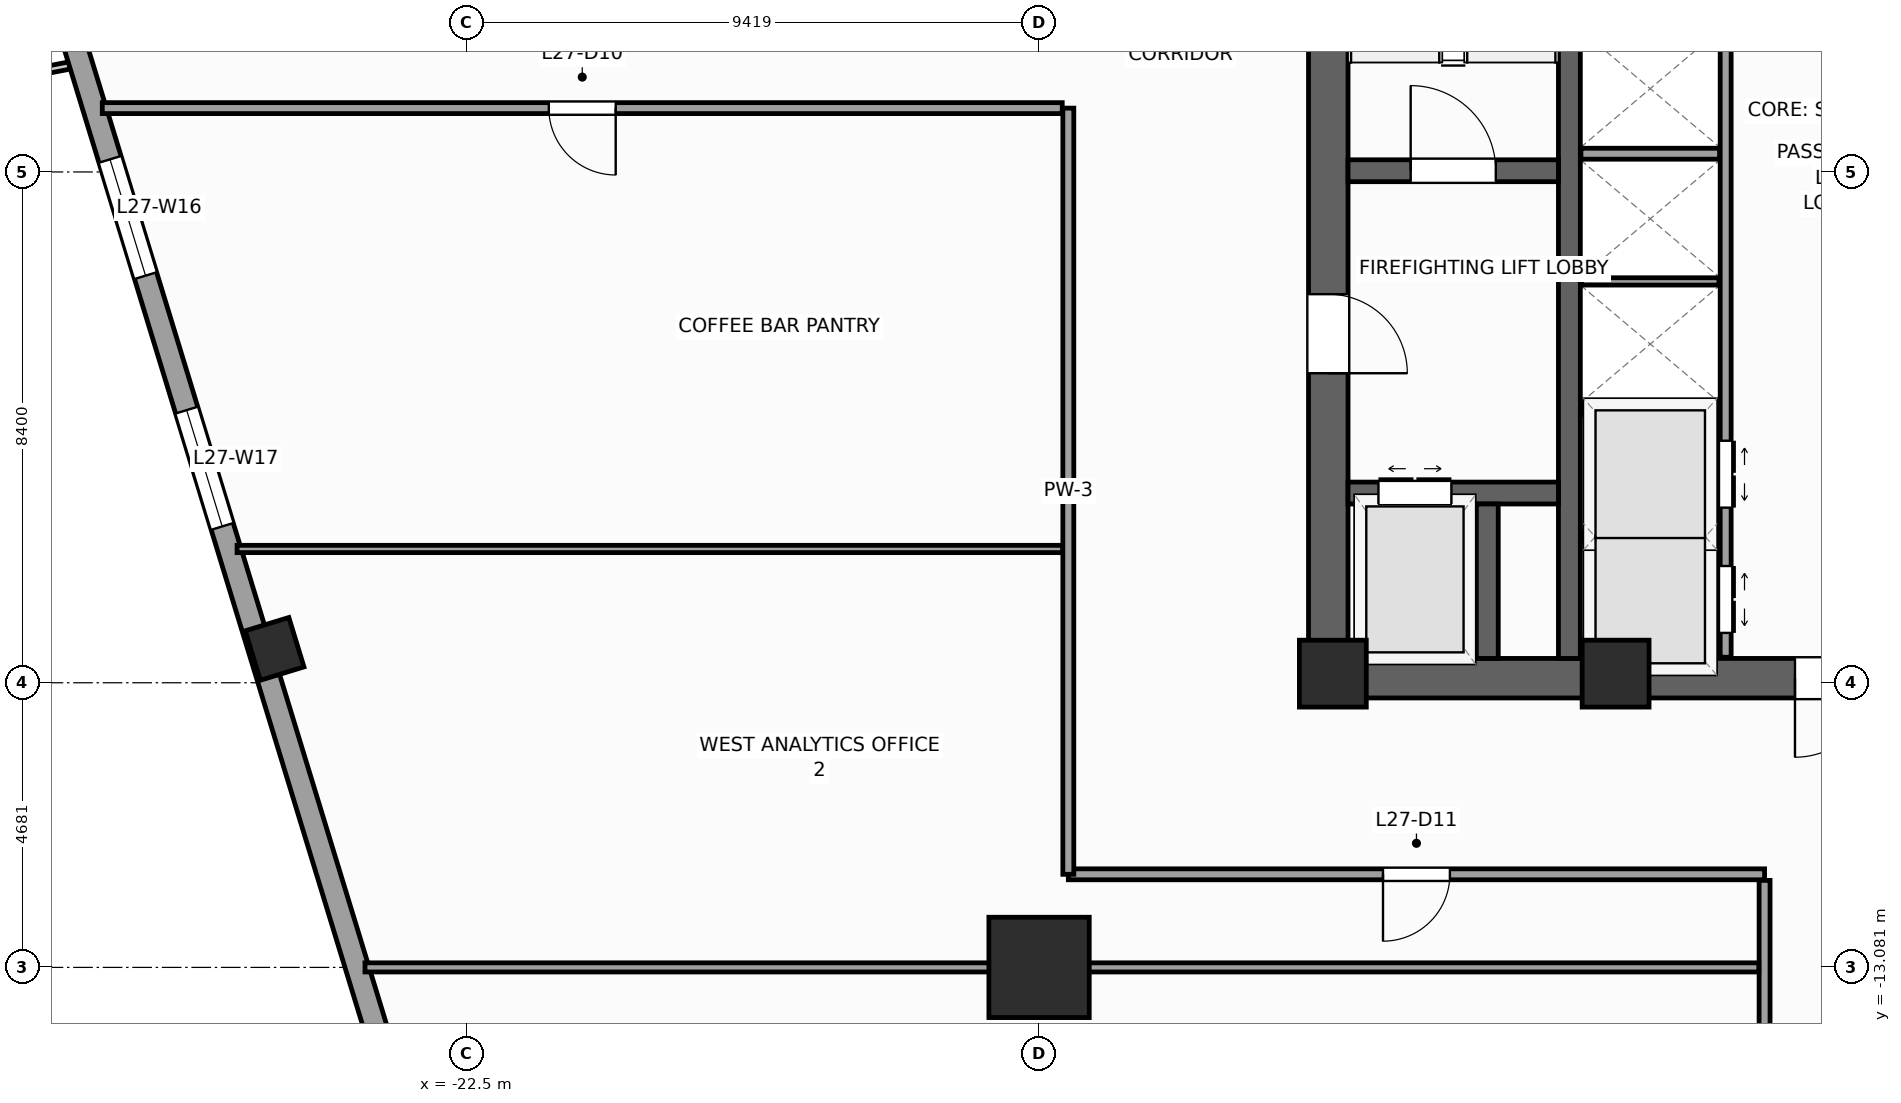
"""IFC4 building model, lengths in metres.
Left out: names, types, materials, properties, quantities, classifications, styles, units other than length and angle.
Written with IfcOpenShell. Run it as: python <this file> out.ifc"""

import sys

from ifc_helpers import new_model, si_unit, direction, frame, frame_2d, origin, origin_2d, place, context, subcontext, project, spatial, rectangle, extrude, source, transform, mapped, element, fill, save


model = new_model("IFC4")
c1 = context("Model", 3, precision=1e-05, world=origin(), true_north=direction((0.0, 1.0)))
c2 = subcontext(c1, "Body", "Model", "MODEL_VIEW")
j1 = project(units=[si_unit("LENGTHUNIT", "METRE"), si_unit("PLANEANGLEUNIT", "RADIAN")], contexts=[c1])
p1 = place(None, origin())
s1 = spatial("IfcSite", under=j1, at=p1, CompositionType="ELEMENT")
p2 = place(p1, origin())
s2 = spatial("IfcBuilding", under=s1, at=p2, CompositionType="ELEMENT")
p3 = place(p2, frame((0.0, 0.0, 115.2)))
s3 = spatial("IfcBuildingStorey", under=s2, at=p3, CompositionType="ELEMENT", Elevation=115.2)
p4 = place(p3, frame((-8.65, -8.325, 0.0), z_axis=(0.0, 0.0, 1.0), x_axis=(1.0, 0.0, 0.0)))
e1 = element("IfcWall", 1, at=p4, inside=s3, PredefinedType="SHEAR", context=c2, shape_type="SweptSolid", body=[
    extrude(rectangle(XDim=17.3, YDim=0.65, at=frame_2d((8.65, 0.0))), origin(), (0.0, 0.0, 1.0), 4.0),
])
p5 = place(p4, frame((8.0, 0.0, 0.0)))
e2 = element("IfcOpeningElement", 2, at=p5, cuts=e1, PredefinedType="OPENING", context=c2, shape_type="SweptSolid", body=[
    extrude(rectangle(XDim=1.3, YDim=2.2, at=frame_2d((0.65, 1.1))), frame((0.0, 0.335, 0.0), z_axis=(0.0, -1.0, 0.0), x_axis=(1.0, 0.0, 0.0)), (0.0, 0.0, 1.0), 0.67),
])
p6 = place(p3, frame((-8.325, -8.0, 0.0), z_axis=(0.0, 0.0, 1.0), x_axis=(0.0, 1.0, 0.0)))
e3 = element("IfcWall", 3, at=p6, inside=s3, PredefinedType="SHEAR", context=c2, shape_type="SweptSolid", body=[
    extrude(rectangle(XDim=16.0, YDim=0.65, at=frame_2d((8.0, 0.0))), origin(), (0.0, 0.0, 1.0), 4.0),
])
p7 = place(p6, frame((4.69, 0.0, 0.0)))
e4 = element("IfcOpeningElement", 4, at=p7, cuts=e3, PredefinedType="OPENING", context=c2, shape_type="SweptSolid", body=[
    extrude(rectangle(XDim=1.3, YDim=2.2, at=frame_2d((0.65, 1.1))), frame((0.0, 0.335, 0.0), z_axis=(0.0, -1.0, 0.0), x_axis=(1.0, 0.0, 0.0)), (0.0, 0.0, 1.0), 0.67),
])
p8 = place(p3, frame((-4.36, -8.0, 0.0), z_axis=(0.0, 0.0, 1.0), x_axis=(0.0, 1.0, 0.0)))
e5 = element("IfcWall", 5, at=p8, inside=s3, PredefinedType="SHEAR", context=c2, shape_type="SweptSolid", body=[
    extrude(rectangle(XDim=16.0, YDim=0.36, at=frame_2d((8.0, 0.0))), origin(), (0.0, 0.0, 1.0), 4.0),
])
p9 = place(p3, frame((-8.0, 0.02, 0.0), z_axis=(0.0, 0.0, 1.0), x_axis=(1.0, 0.0, 0.0)))
e6 = element("IfcWall", 6, at=p9, inside=s3, PredefinedType="SHEAR", context=c2, shape_type="SweptSolid", body=[
    extrude(rectangle(XDim=3.46, YDim=0.36, at=frame_2d((1.73, 0.0))), origin(), (0.0, 0.0, 1.0), 4.0),
])
p10 = place(p9, frame((1.03, 0.0, 0.0)))
e7 = element("IfcOpeningElement", 7, at=p10, cuts=e6, PredefinedType="OPENING", context=c2, shape_type="SweptSolid", body=[
    extrude(rectangle(XDim=1.4, YDim=2.2, at=frame_2d((0.7, 1.1))), frame((0.0, 0.19, 0.0), z_axis=(0.0, -1.0, 0.0), x_axis=(1.0, 0.0, 0.0)), (0.0, 0.0, 1.0), 0.38),
])
p11 = place(p3, frame((-8.0, -5.28, 0.0), z_axis=(0.0, 0.0, 1.0), x_axis=(1.0, 0.0, 0.0)))
e8 = element("IfcWall", 8, at=p11, inside=s3, PredefinedType="SHEAR", context=c2, shape_type="SweptSolid", body=[
    extrude(rectangle(XDim=3.46, YDim=0.36, at=frame_2d((1.73, 0.0))), origin(), (0.0, 0.0, 1.0), 4.0),
])
p12 = place(p11, frame((0.5, 0.0, 0.0)))
e9 = element("IfcOpeningElement", 9, at=p12, cuts=e8, PredefinedType="OPENING", context=c2, shape_type="SweptSolid", body=[
    extrude(rectangle(XDim=1.2, YDim=2.25, at=frame_2d((0.6, 1.125))), frame((0.0, 0.19, 0.0), z_axis=(0.0, -1.0, 0.0), x_axis=(1.0, 0.0, 0.0)), (0.0, 0.0, 1.0), 0.38),
])
p13 = place(p3, frame((-5.71, -8.0, 0.0), z_axis=(0.0, 0.0, 1.0), x_axis=(0.0, 1.0, 0.0)))
e10 = element("IfcWall", 10, at=p13, inside=s3, PredefinedType="SHEAR", context=c2, shape_type="SweptSolid", body=[
    extrude(rectangle(XDim=2.54, YDim=0.36, at=frame_2d((1.27, 0.0))), origin(), (0.0, 0.0, 1.0), 4.0),
])
m1 = source(origin(), c2, "Body", "SweptSolid", [
    extrude(rectangle(XDim=1.1, YDim=1.1, at=origin_2d()), origin(), (0.0, 0.0, 1.0), 4.0),
])
for number, where, z_axis, x_axis in (
    (11, (-8.25, -8.25, 0.0), (0.0, 0.0, 1.0), (1.0, 0.0, 0.0)),
    (12, (-3.6, -8.25, 0.0), (0.0, 0.0, 1.0), (1.0, 0.0, 0.0)),
):
    element("IfcColumn", number, at=place(p3, frame(where, z_axis=z_axis, x_axis=x_axis)), inside=s3, PredefinedType="PILASTER", context=c2, shape_type="MappedRepresentation", body=[
        mapped(m1, transform((0.0, 0.0, 0.0), scale=1.0)),
    ])
m2 = source(origin(), c2, "Body", "SweptSolid", [
    extrude(rectangle(XDim=1.65, YDim=1.65, at=origin_2d()), origin(), (0.0, 0.0, 1.0), 4.0),
])
p14 = place(p3, frame((-13.081, -13.081, 0.0), z_axis=(0.0, 0.0, 1.0), x_axis=(1.0, 0.0, 0.0)))
e13 = element("IfcColumn", 13, at=p14, inside=s3, PredefinedType="COLUMN", context=c2, shape_type="MappedRepresentation", body=[
    mapped(m2, transform((0.0, 0.0, 0.0), scale=1.0)),
])
m3 = source(origin(), c2, "Body", "SweptSolid", [
    extrude(rectangle(XDim=0.75, YDim=0.85, at=origin_2d()), origin(), (0.0, 0.0, 1.0), 4.0),
])
p15 = place(p3, frame((-25.653, -7.843, 0.0), z_axis=(0.0, 0.0, 1.0), x_axis=(0.956304755963, 0.292371704723, 0.0)))
e14 = element("IfcColumn", 14, at=p15, inside=s3, PredefinedType="COLUMN", context=c2, shape_type="MappedRepresentation", body=[
    mapped(m3, transform((0.0, 0.0, 0.0), scale=1.0)),
])
p16 = place(p3, frame((-32.658, 14.265, 0.0), z_axis=(0.0, 0.0, 1.0), x_axis=(0.292373127906, -0.956304320851, 0.0)))
e15 = element("IfcWall", 15, at=p16, inside=s3, PredefinedType="STANDARD", context=c2, shape_type="SweptSolid", body=[
    extrude(rectangle(XDim=46.38, YDim=0.38, at=frame_2d((23.19, 0.0))), origin(), (0.0, 0.0, 1.0), 3.14),
])
p17 = place(p16, frame((4.865, 0.0, 0.51)))
e16 = element("IfcOpeningElement", 16, at=p17, cuts=e15, PredefinedType="OPENING", context=c2, shape_type="SweptSolid", body=[
    extrude(rectangle(XDim=1.4, YDim=2.4, at=frame_2d((0.7, 1.2))), frame((0.0, 0.2, 0.0), z_axis=(0.0, -1.0, 0.0), x_axis=(1.0, 0.0, 0.0)), (0.0, 0.0, 1.0), 0.4),
])
p18 = place(p16, frame((14.7, 0.0, 0.51)))
e17 = element("IfcOpeningElement", 17, at=p18, cuts=e15, PredefinedType="OPENING", context=c2, shape_type="SweptSolid", body=[
    extrude(rectangle(XDim=2.0, YDim=2.4, at=frame_2d((1.0, 1.2))), frame((0.0, 0.2, 0.0), z_axis=(0.0, -1.0, 0.0), x_axis=(1.0, 0.0, 0.0)), (0.0, 0.0, 1.0), 0.4),
])
p19 = place(p16, frame((19.012, 0.0, 0.51)))
e18 = element("IfcOpeningElement", 18, at=p19, cuts=e15, PredefinedType="OPENING", context=c2, shape_type="SweptSolid", body=[
    extrude(rectangle(XDim=2.0, YDim=2.4, at=frame_2d((1.0, 1.2))), frame((0.0, 0.2, 0.0), z_axis=(0.0, -1.0, 0.0), x_axis=(1.0, 0.0, 0.0)), (0.0, 0.0, 1.0), 0.4),
])
p20 = place(p16, frame((30.538, 0.0, 0.51)))
e19 = element("IfcOpeningElement", 19, at=p20, cuts=e15, PredefinedType="OPENING", context=c2, shape_type="SweptSolid", body=[
    extrude(rectangle(XDim=2.0, YDim=2.4, at=frame_2d((1.0, 1.2))), frame((0.0, 0.2, 0.0), z_axis=(0.0, -1.0, 0.0), x_axis=(1.0, 0.0, 0.0)), (0.0, 0.0, 1.0), 0.4),
])
p21 = place(p16, frame((39.187, 0.0, 0.51)))
e20 = element("IfcOpeningElement", 20, at=p21, cuts=e15, PredefinedType="OPENING", context=c2, shape_type="SweptSolid", body=[
    extrude(rectangle(XDim=1.4, YDim=2.4, at=frame_2d((0.7, 1.2))), frame((0.0, 0.2, 0.0), z_axis=(0.0, -1.0, 0.0), x_axis=(1.0, 0.0, 0.0)), (0.0, 0.0, 1.0), 0.4),
])
p22 = place(p3, frame((-1.79, -7.98, 0.0), z_axis=(0.0, 0.0, 1.0), x_axis=(0.0, 1.0, 0.0)))
e21 = element("IfcWall", 21, at=p22, inside=s3, PredefinedType="PARTITIONING", context=c2, shape_type="SweptSolid", body=[
    extrude(rectangle(XDim=12.38, YDim=0.18, at=frame_2d((6.19, 0.0))), origin(), (0.0, 0.0, 1.0), 3.74),
])
p23 = place(p22, frame((0.4, 0.0, 0.0)))
e22 = element("IfcOpeningElement", 22, at=p23, cuts=e21, PredefinedType="OPENING", context=c2, shape_type="SweptSolid", body=[
    extrude(rectangle(XDim=1.1, YDim=2.2, at=frame_2d((0.55, 1.1))), frame((0.0, 0.1, 0.0), z_axis=(0.0, -1.0, 0.0), x_axis=(1.0, 0.0, 0.0)), (0.0, 0.0, 1.0), 0.2),
])
p24 = place(p22, frame((2.46, 0.0, 0.0)))
e23 = element("IfcOpeningElement", 23, at=p24, cuts=e21, PredefinedType="OPENING", context=c2, shape_type="SweptSolid", body=[
    extrude(rectangle(XDim=1.1, YDim=2.2, at=frame_2d((0.55, 1.1))), frame((0.0, 0.1, 0.0), z_axis=(0.0, -1.0, 0.0), x_axis=(1.0, 0.0, 0.0)), (0.0, 0.0, 1.0), 0.2),
])
for number, where, z_axis, x_axis in (
    (24, (-4.17, -3.9, 0.0), (0.0, 0.0, 1.0), (1.0, 0.0, 0.0)),
    (25, (-4.17, 0.3, 0.0), (0.0, 0.0, 1.0), (1.0, 0.0, 0.0)),
):
    element("IfcWall", number, at=place(p3, frame(where, z_axis=z_axis, x_axis=x_axis)), inside=s3, PredefinedType="PARTITIONING", context=c2, shape_type="SweptSolid", body=[
        extrude(rectangle(XDim=2.28, YDim=0.18, at=frame_2d((1.14, 0.0))), origin(), (0.0, 0.0, 1.0), 3.74),
    ])
for number, where, z_axis, x_axis in (
    (26, (-4.16, -6.0, 0.0), (0.0, 0.0, 1.0), (1.0, 0.0, 0.0)),
    (27, (-4.16, -1.8, 0.0), (0.0, 0.0, 1.0), (1.0, 0.0, 0.0)),
):
    element("IfcWall", number, at=place(p3, frame(where, z_axis=z_axis, x_axis=x_axis)), inside=s3, PredefinedType="PARTITIONING", context=c2, shape_type="SweptSolid", body=[
        extrude(rectangle(XDim=2.26, YDim=0.12, at=frame_2d((1.13, 0.0))), origin(), (0.0, 0.0, 1.0), 3.74),
    ])
p25 = place(p3, frame((-12.6, -11.55, 0.0), z_axis=(0.0, 0.0, 1.0), x_axis=(1.0, 0.0, 0.0)))
e28 = element("IfcWall", 28, at=p25, inside=s3, PredefinedType="PARTITIONING", context=c2, shape_type="SweptSolid", body=[
    extrude(rectangle(XDim=11.45, YDim=0.18, at=frame_2d((5.725, 0.0))), origin(), (0.0, 0.0, 1.0), 3.74),
])
p26 = place(p25, frame((5.175, 0.0, 0.0)))
e29 = element("IfcOpeningElement", 29, at=p26, cuts=e28, PredefinedType="OPENING", context=c2, shape_type="SweptSolid", body=[
    extrude(rectangle(XDim=1.1, YDim=2.2, at=frame_2d((0.55, 1.1))), frame((0.0, 0.1, 0.0), z_axis=(0.0, -1.0, 0.0), x_axis=(1.0, 0.0, 0.0)), (0.0, 0.0, 1.0), 0.2),
])
p27 = place(p3, frame((-12.6, -11.55, 0.0), z_axis=(0.0, 0.0, 1.0), x_axis=(0.0, 1.0, 0.0)))
e30 = element("IfcWall", 30, at=p27, inside=s3, PredefinedType="PARTITIONING", context=c2, shape_type="SweptSolid", body=[
    extrude(rectangle(XDim=12.6, YDim=0.18, at=frame_2d((6.3, 0.0))), origin(), (0.0, 0.0, 1.0), 3.74),
])
p28 = place(p3, frame((-28.487, 1.05, 0.0), z_axis=(0.0, 0.0, 1.0), x_axis=(1.0, 0.0, 0.0)))
e31 = element("IfcWall", 31, at=p28, inside=s3, PredefinedType="PARTITIONING", context=c2, shape_type="SweptSolid", body=[
    extrude(rectangle(XDim=15.787, YDim=0.18, at=frame_2d((7.894, 0.0))), origin(), (0.0, 0.0, 1.0), 3.74),
])
p29 = place(p28, frame((7.343, 0.0, 0.0)))
e32 = element("IfcOpeningElement", 32, at=p29, cuts=e31, PredefinedType="OPENING", context=c2, shape_type="SweptSolid", body=[
    extrude(rectangle(XDim=1.1, YDim=2.2, at=frame_2d((0.55, 1.1))), frame((0.0, 0.1, 0.0), z_axis=(0.0, -1.0, 0.0), x_axis=(1.0, 0.0, 0.0)), (0.0, 0.0, 1.0), 0.2),
])
p30 = place(p3, frame((-1.15, -28.517, 0.0), z_axis=(0.0, 0.0, 1.0), x_axis=(0.0, 1.0, 0.0)))
e33 = element("IfcWall", 33, at=p30, inside=s3, PredefinedType="PARTITIONING", context=c2, shape_type="SweptSolid", body=[
    extrude(rectangle(XDim=16.867, YDim=0.18, at=frame_2d((8.434, 0.0))), origin(), (0.0, 0.0, 1.0), 3.74),
])
p31 = place(p30, frame((7.333, 0.0, 0.0)))
e34 = element("IfcOpeningElement", 34, at=p31, cuts=e33, PredefinedType="OPENING", context=c2, shape_type="SweptSolid", body=[
    extrude(rectangle(XDim=1.1, YDim=2.2, at=frame_2d((0.55, 1.1))), frame((0.0, 0.1, 0.0), z_axis=(0.0, -1.0, 0.0), x_axis=(1.0, 0.0, 0.0)), (0.0, 0.0, 1.0), 0.2),
])
p32 = place(p3, frame((-24.167, -13.081, 0.0), z_axis=(0.0, 0.0, 1.0), x_axis=(1.0, 0.0, 0.0)))
e35 = element("IfcWall", 35, at=p32, inside=s3, PredefinedType="PARTITIONING", context=c2, shape_type="SweptSolid", body=[
    extrude(rectangle(XDim=22.921, YDim=0.15, at=frame_2d((11.461, 0.0))), origin(), (0.0, 0.0, 1.0), 2.732),
])
p33 = place(p3, frame((-26.27, -6.2, 0.0), z_axis=(0.0, 0.0, 1.0), x_axis=(1.0, 0.0, 0.0)))
e36 = element("IfcWall", 36, at=p33, inside=s3, PredefinedType="PARTITIONING", context=c2, shape_type="SweptSolid", body=[
    extrude(rectangle(XDim=13.575, YDim=0.12, at=frame_2d((6.788, 0.0))), origin(), (0.0, 0.0, 1.0), 3.74),
])
m4 = source(origin(), c2, "Body", "SweptSolid", [
    extrude(rectangle(XDim=2.0, YDim=2.4, at=frame_2d((1.0, 1.2))), frame((0.0, 0.03, 0.0), z_axis=(0.0, -1.0, 0.0), x_axis=(1.0, 0.0, 0.0)), (0.0, 0.0, 1.0), 0.06),
])
p34 = place(p18, origin())
e37 = element("IfcWindow", 37, at=p34, inside=s3, PartitioningType="SINGLE_PANEL", PredefinedType="WINDOW", context=c2, shape_type="MappedRepresentation", body=[
    mapped(m4, transform((0.0, 0.0, 0.0), scale=1.0)),
])
fill(e17, e37)
p35 = place(p19, origin())
e38 = element("IfcWindow", 38, at=p35, inside=s3, PartitioningType="SINGLE_PANEL", PredefinedType="WINDOW", context=c2, shape_type="MappedRepresentation", body=[
    mapped(m4, transform((0.0, 0.0, 0.0), scale=1.0)),
])
fill(e18, e38)
m5 = source(origin(), c2, "Body", "SweptSolid", [
    extrude(rectangle(XDim=1.4, YDim=2.2, at=frame_2d((0.7, 1.1))), frame((0.0, 0.025, 0.0), z_axis=(0.0, -1.0, 0.0), x_axis=(1.0, 0.0, 0.0)), (0.0, 0.0, 1.0), 0.05),
])
p36 = place(p10, origin())
e39 = element("IfcDoor", 39, at=p36, inside=s3, OperationType="SINGLE_SWING_LEFT", PredefinedType="DOOR", context=c2, shape_type="MappedRepresentation", body=[
    mapped(m5, transform((0.0, 0.0, 0.0), scale=1.0)),
])
fill(e7, e39)
m6 = source(origin(), c2, "Body", "SweptSolid", [
    extrude(rectangle(XDim=1.3, YDim=2.2, at=frame_2d((0.65, 1.1))), frame((0.0, 0.025, 0.0), z_axis=(0.0, -1.0, 0.0), x_axis=(1.0, 0.0, 0.0)), (0.0, 0.0, 1.0), 0.05),
])
p37 = place(p7, frame((1.3, 0.0, 0.0), z_axis=(0.0, 0.0, 1.0), x_axis=(-1.0, 0.0, 0.0)))
e40 = element("IfcDoor", 40, at=p37, inside=s3, OperationType="SINGLE_SWING_LEFT", PredefinedType="DOOR", context=c2, shape_type="MappedRepresentation", body=[
    mapped(m6, transform((0.0, 0.0, 0.0), scale=1.0)),
])
fill(e4, e40)
p38 = place(p5, frame((1.3, 0.0, 0.0), z_axis=(0.0, 0.0, 1.0), x_axis=(-1.0, 0.0, 0.0)))
e41 = element("IfcDoor", 41, at=p38, inside=s3, OperationType="SINGLE_SWING_LEFT", PredefinedType="DOOR", context=c2, shape_type="MappedRepresentation", body=[
    mapped(m6, transform((0.0, 0.0, 0.0), scale=1.0)),
])
fill(e2, e41)
m7 = source(origin(), c2, "Body", "SweptSolid", [
    extrude(rectangle(XDim=1.2, YDim=2.25, at=frame_2d((0.6, 1.125))), frame((0.0, 0.025, 0.0), z_axis=(0.0, -1.0, 0.0), x_axis=(1.0, 0.0, 0.0)), (0.0, 0.0, 1.0), 0.05),
])
p39 = place(p12, origin())
e42 = element("IfcDoor", 42, at=p39, inside=s3, OperationType="DOUBLE_DOOR_SLIDING", PredefinedType="DOOR", context=c2, shape_type="MappedRepresentation", body=[
    mapped(m7, transform((0.0, 0.0, 0.0), scale=1.0)),
])
fill(e9, e42)
m8 = source(origin(), c2, "Body", "SweptSolid", [
    extrude(rectangle(XDim=1.1, YDim=2.2, at=frame_2d((0.55, 1.1))), frame((0.0, 0.025, 0.0), z_axis=(0.0, -1.0, 0.0), x_axis=(1.0, 0.0, 0.0)), (0.0, 0.0, 1.0), 0.05),
])
p40 = place(p23, frame((1.1, 0.0, 0.0), z_axis=(0.0, 0.0, 1.0), x_axis=(-1.0, 0.0, 0.0)))
e43 = element("IfcDoor", 43, at=p40, inside=s3, OperationType="DOUBLE_DOOR_SLIDING", PredefinedType="DOOR", context=c2, shape_type="MappedRepresentation", body=[
    mapped(m8, transform((0.0, 0.0, 0.0), scale=1.0)),
])
fill(e22, e43)
p41 = place(p24, frame((1.1, 0.0, 0.0), z_axis=(0.0, 0.0, 1.0), x_axis=(-1.0, 0.0, 0.0)))
e44 = element("IfcDoor", 44, at=p41, inside=s3, OperationType="DOUBLE_DOOR_SLIDING", PredefinedType="DOOR", context=c2, shape_type="MappedRepresentation", body=[
    mapped(m8, transform((0.0, 0.0, 0.0), scale=1.0)),
])
fill(e23, e44)
p42 = place(p29, frame((1.1, 0.0, 0.0), z_axis=(0.0, 0.0, 1.0), x_axis=(-1.0, 0.0, 0.0)))
e45 = element("IfcDoor", 45, at=p42, inside=s3, OperationType="SINGLE_SWING_RIGHT", PredefinedType="DOOR", context=c2, shape_type="MappedRepresentation", body=[
    mapped(m8, transform((0.0, 0.0, 0.0), scale=1.0)),
])
fill(e32, e45)
p43 = place(p26, frame((1.1, 0.0, 0.0), z_axis=(0.0, 0.0, 1.0), x_axis=(-1.0, 0.0, 0.0)))
e46 = element("IfcDoor", 46, at=p43, inside=s3, OperationType="SINGLE_SWING_LEFT", PredefinedType="DOOR", context=c2, shape_type="MappedRepresentation", body=[
    mapped(m8, transform((0.0, 0.0, 0.0), scale=1.0)),
])
fill(e29, e46)
save(model, sys.argv[1])
